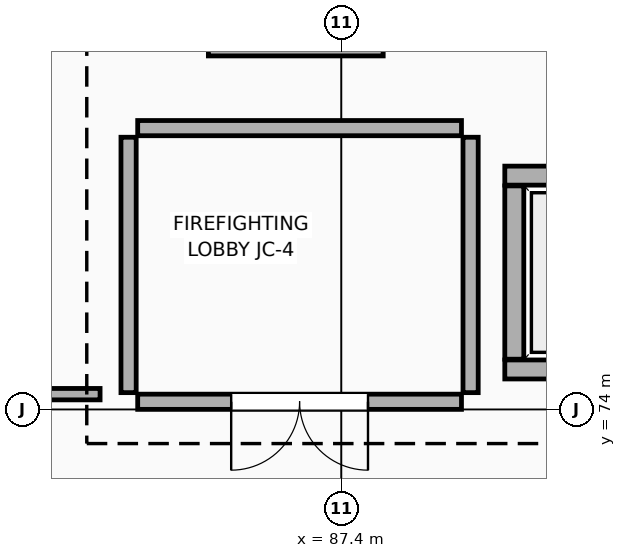
"""IFC4 building model, lengths in metres.
Left out: names, types, materials, properties, quantities, classifications, styles, units other than length and angle.
Written with IfcOpenShell. Run it as: python <this file> out.ifc"""

import sys

from ifc_helpers import new_model, si_unit, direction, frame, frame_2d, origin, place, context, subcontext, project, spatial, rectangle, extrude, element, fill, save


model = new_model("IFC4")
c1 = context("Model", 3, precision=1e-05, world=origin(), true_north=direction((0.0, 1.0)))
c2 = subcontext(c1, "Body", "Model", "MODEL_VIEW")
j1 = project(units=[si_unit("LENGTHUNIT", "METRE"), si_unit("PLANEANGLEUNIT", "RADIAN")], contexts=[c1])
p1 = place(None, origin())
s1 = spatial("IfcSite", under=j1, at=p1, CompositionType="ELEMENT")
p2 = place(p1, origin())
s2 = spatial("IfcBuilding", under=s1, at=p2, CompositionType="ELEMENT")
p3 = place(p2, origin())
s3 = spatial("IfcBuildingStorey", under=s2, at=p3, CompositionType="ELEMENT", Elevation=0.0)
p4 = place(p3, frame((89.55, 74.525, 0.0), z_axis=(0.0, 0.0, 1.0), x_axis=(1.0, 0.0, 0.0)))
e1 = element("IfcWall", 1, at=p4, inside=s3, PredefinedType="STANDARD", context=c2, shape_type="SweptSolid", body=[
    extrude(rectangle(XDim=2.5, YDim=0.25, at=frame_2d((1.25, 0.0))), origin(), (0.0, 0.0, 1.0), 5.11),
])
p5 = place(p4, frame((0.65, 0.0, 0.0)))
e2 = element("IfcOpeningElement", 2, at=p5, cuts=e1, PredefinedType="OPENING", context=c2, shape_type="SweptSolid", body=[
    extrude(rectangle(XDim=1.2, YDim=2.05, at=frame_2d((0.6, 1.025))), frame((0.0, 0.135, 0.0), z_axis=(0.0, -1.0, 0.0), x_axis=(1.0, 0.0, 0.0)), (0.0, 0.0, 1.0), 0.27),
])
p6 = place(p3, frame((92.05, 77.075, 0.0), z_axis=(0.0, 0.0, 1.0), x_axis=(-1.0, 0.0, 0.0)))
e3 = element("IfcWall", 3, at=p6, inside=s3, PredefinedType="STANDARD", context=c2, shape_type="SweptSolid", body=[
    extrude(rectangle(XDim=2.5, YDim=0.25, at=frame_2d((1.25, 0.0))), origin(), (0.0, 0.0, 1.0), 5.11),
])
p7 = place(p3, frame((89.675, 76.94, 0.0), z_axis=(0.0, 0.0, 1.0), x_axis=(0.0, -1.0, 0.0)))
e4 = element("IfcWall", 4, at=p7, inside=s3, PredefinedType="STANDARD", context=c2, shape_type="SweptSolid", body=[
    extrude(rectangle(XDim=2.28, YDim=0.25, at=frame_2d((1.14, 0.0))), origin(), (0.0, 0.0, 1.0), 5.11),
])
p8 = place(p3, frame((85.65, 78.775, 0.0), z_axis=(0.0, 0.0, 1.0), x_axis=(1.0, 0.0, 0.0)))
e5 = element("IfcWall", 5, at=p8, inside=s3, PredefinedType="STANDARD", context=c2, shape_type="SweptSolid", body=[
    extrude(rectangle(XDim=2.3, YDim=0.25, at=frame_2d((1.15, 0.0))), origin(), (0.0, 0.0, 1.0), 5.11),
])
p9 = place(p3, frame((84.6, 74.22, 0.0), z_axis=(0.0, 0.0, 1.0), x_axis=(0.0, 1.0, 0.0)))
e6 = element("IfcWall", 6, at=p9, inside=s3, PredefinedType="PARTITIONING", context=c2, shape_type="SweptSolid", body=[
    extrude(rectangle(XDim=3.36, YDim=0.2, at=frame_2d((1.68, 0.0))), origin(), (0.0, 0.0, 1.0), 5.11),
])
p10 = place(p3, frame((84.72, 77.7, 0.0), z_axis=(0.0, 0.0, 1.0), x_axis=(1.0, 0.0, 0.0)))
e7 = element("IfcWall", 7, at=p10, inside=s3, PredefinedType="PARTITIONING", context=c2, shape_type="SweptSolid", body=[
    extrude(rectangle(XDim=4.26, YDim=0.2, at=frame_2d((2.13, 0.0))), origin(), (0.0, 0.0, 1.0), 5.11),
])
p11 = place(p3, frame((89.1, 77.58, 0.0), z_axis=(0.0, 0.0, 1.0), x_axis=(0.0, -1.0, 0.0)))
e8 = element("IfcWall", 8, at=p11, inside=s3, PredefinedType="PARTITIONING", context=c2, shape_type="SweptSolid", body=[
    extrude(rectangle(XDim=3.36, YDim=0.2, at=frame_2d((1.68, 0.0))), origin(), (0.0, 0.0, 1.0), 5.11),
])
p12 = place(p3, frame((88.98, 74.1, 0.0), z_axis=(0.0, 0.0, 1.0), x_axis=(-1.0, 0.0, 0.0)))
e9 = element("IfcWall", 9, at=p12, inside=s3, PredefinedType="PARTITIONING", context=c2, shape_type="SweptSolid", body=[
    extrude(rectangle(XDim=4.26, YDim=0.2, at=frame_2d((2.13, 0.0))), origin(), (0.0, 0.0, 1.0), 5.11),
])
p13 = place(p12, frame((1.23, 0.0, 0.0)))
e10 = element("IfcOpeningElement", 10, at=p13, cuts=e9, PredefinedType="OPENING", context=c2, shape_type="SweptSolid", body=[
    extrude(rectangle(XDim=1.8, YDim=2.15, at=frame_2d((0.9, 1.075))), frame((0.0, 0.11, 0.0), z_axis=(0.0, -1.0, 0.0), x_axis=(1.0, 0.0, 0.0)), (0.0, 0.0, 1.0), 0.22),
])
p14 = place(p3, frame((84.225, 74.2, 0.0), z_axis=(0.0, 0.0, 1.0), x_axis=(-1.0, 0.0, 0.0)))
e11 = element("IfcWall", 11, at=p14, inside=s3, PredefinedType="PARTITIONING", context=c2, shape_type="SweptSolid", body=[
    extrude(rectangle(XDim=4.485, YDim=0.15, at=frame_2d((2.243, 0.0))), origin(), (0.0, 0.0, 1.0), 5.11),
])
p15 = place(p13, origin())
e12 = element("IfcDoor", 12, at=p15, inside=s3, OperationType="DOUBLE_DOOR_SINGLE_SWING", PredefinedType="DOOR", context=c2, shape_type="SweptSolid", body=[
    extrude(rectangle(XDim=1.8, YDim=2.15, at=frame_2d((0.9, 1.075))), frame((0.0, 0.025, 0.0), z_axis=(0.0, -1.0, 0.0), x_axis=(1.0, 0.0, 0.0)), (0.0, 0.0, 1.0), 0.05),
])
fill(e10, e12)
save(model, sys.argv[1])
